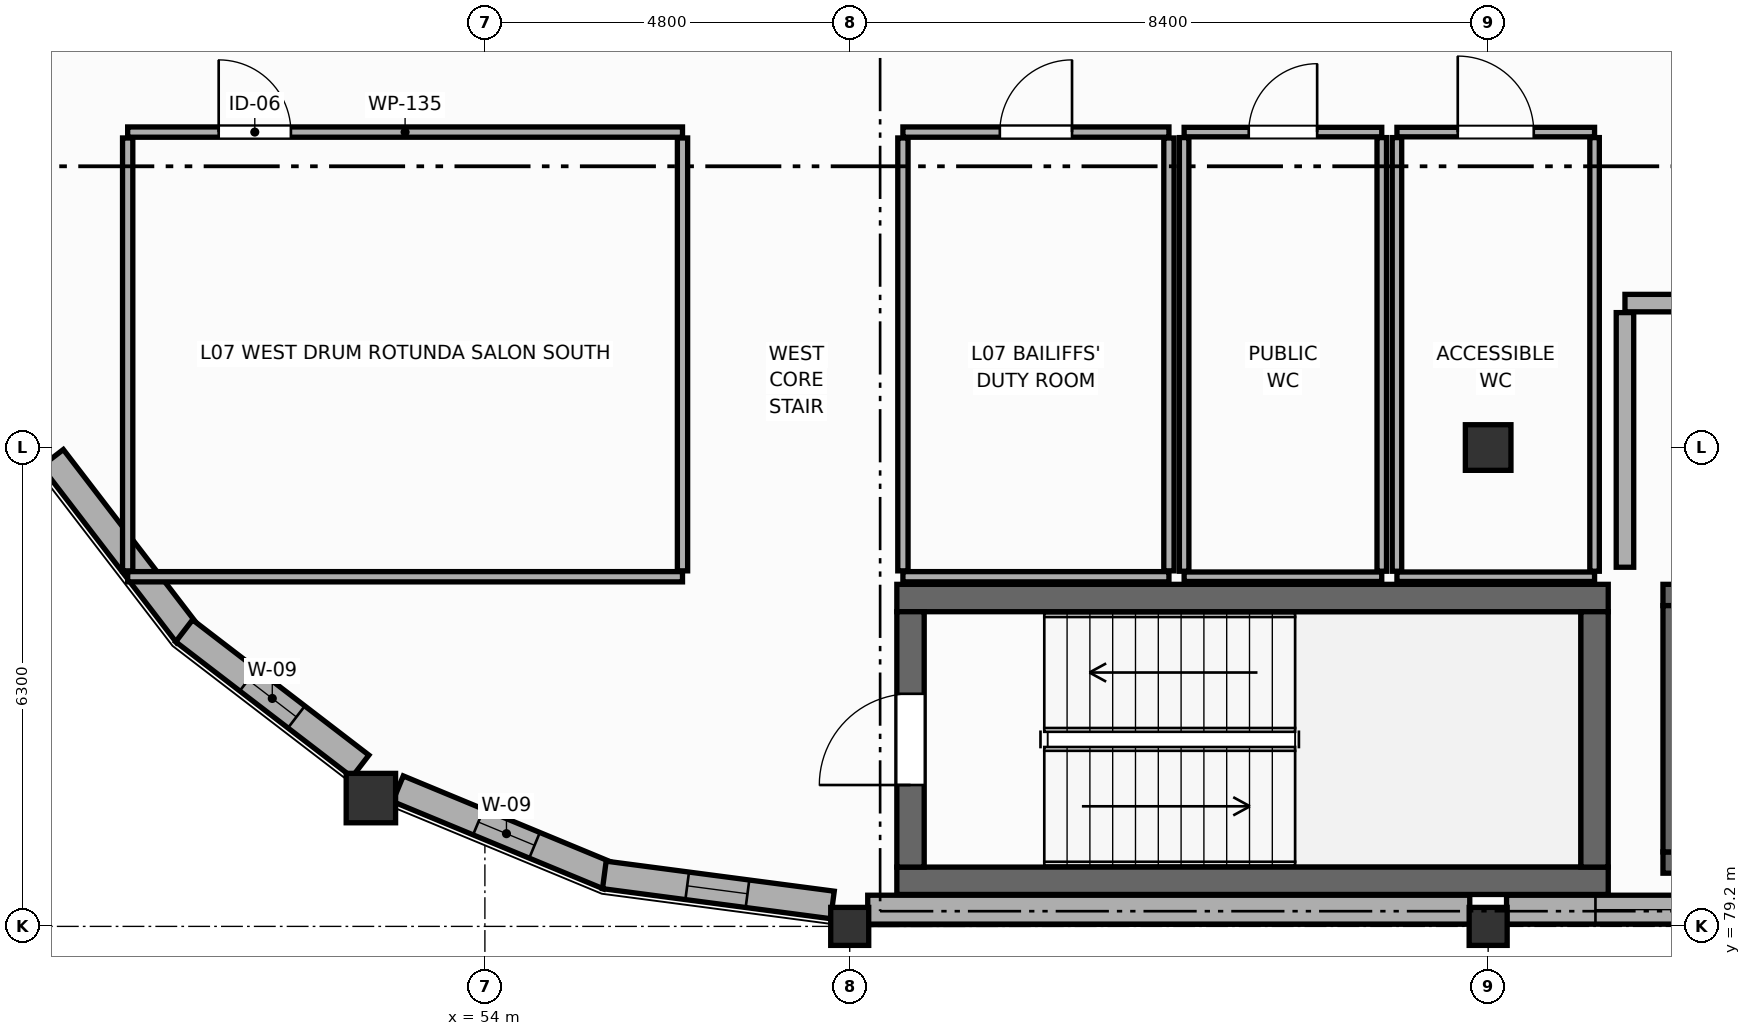
"""IFC4 building model, lengths in metres.
Left out: names, types, materials, properties, quantities, classifications, styles, units other than length and angle.
Written with IfcOpenShell. Run it as: python <this file> out.ifc"""

import sys

from ifc_helpers import new_model, si_unit, direction, frame, frame_2d, origin, origin_2d, place, context, subcontext, project, spatial, rectangle, circle, extrude, element, fill, save


model = new_model("IFC4")
c1 = context("Model", 3, precision=1e-05, world=origin(), true_north=direction((0.0, 1.0)))
c2 = subcontext(c1, "Body", "Model", "MODEL_VIEW")
j1 = project(units=[si_unit("LENGTHUNIT", "METRE"), si_unit("PLANEANGLEUNIT", "RADIAN")], contexts=[c1])
p1 = place(None, origin())
s1 = spatial("IfcSite", under=j1, at=p1, CompositionType="ELEMENT")
p2 = place(p1, origin())
s2 = spatial("IfcBuilding", under=s1, at=p2, CompositionType="ELEMENT")
p3 = place(p2, frame((0.0, 0.0, 27.0)))
s3 = spatial("IfcBuildingStorey", under=s2, at=p3, CompositionType="ELEMENT", Elevation=27.0)
for number, where, z_axis, x_axis in (
    (1, (58.8, 79.2, 0.0), (0.0, 0.0, 1.0), (1.0, 0.0, 0.0)),
    (2, (67.2, 79.2, 0.0), (0.0, 0.0, 1.0), (1.0, 0.0, 0.0)),
):
    element("IfcColumn", number, at=place(p3, frame(where, z_axis=z_axis, x_axis=x_axis)), inside=s3, PredefinedType="COLUMN", context=c2, shape_type="SweptSolid", body=[
        extrude(rectangle(XDim=0.5, YDim=0.5, at=origin_2d()), origin(), (0.0, 0.0, 1.0), 4.2),
    ])
p4 = place(p3, frame((67.2, 85.5, 0.0), z_axis=(0.0, 0.0, 1.0), x_axis=(1.0, 0.0, 0.0)))
e3 = element("IfcColumn", 3, at=p4, inside=s3, PredefinedType="COLUMN", context=c2, shape_type="SweptSolid", body=[
    extrude(rectangle(XDim=0.6, YDim=0.6, at=origin_2d()), origin(), (0.0, 0.0, 1.0), 4.2),
])
p5 = place(p3, frame((52.5, 80.888, 0.0), z_axis=(0.0, 0.0, 1.0), x_axis=(1.0, 0.0, 0.0)))
e4 = element("IfcColumn", 4, at=p5, inside=s3, PredefinedType="COLUMN", context=c2, shape_type="SweptSolid", body=[
    extrude(circle(Radius=0.325, at=origin_2d()), origin(), (0.0, 0.0, 1.0), 4.2),
])
p6 = place(p3, frame((66.958, 79.42, 0.0), z_axis=(0.0, 0.0, 1.0), x_axis=(-1.0, 0.0, 0.0)))
e5 = element("IfcWall", 5, at=p6, inside=s3, PredefinedType="STANDARD", context=c2, shape_type="SweptSolid", body=[
    extrude(rectangle(XDim=7.921, YDim=0.38, at=frame_2d((3.96, 0.0))), origin(), (0.0, 0.0, 1.0), 3.11),
])
p7 = place(p3, frame((75.358, 79.42, 0.0), z_axis=(0.0, 0.0, 1.0), x_axis=(-1.0, 0.0, 0.0)))
e6 = element("IfcWall", 6, at=p7, inside=s3, PredefinedType="STANDARD", context=c2, shape_type="SweptSolid", body=[
    extrude(rectangle(XDim=7.916, YDim=0.38, at=frame_2d((3.958, 0.0))), origin(), (0.0, 0.0, 1.0), 3.51),
])
p8 = place(p7, frame((1.17, 0.0, 0.85)))
e7 = element("IfcOpeningElement", 7, at=p8, cuts=e6, PredefinedType="OPENING", context=c2, shape_type="SweptSolid", body=[
    extrude(rectangle(XDim=1.35, YDim=1.95, at=frame_2d((0.675, 0.975))), frame((0.0, 0.2, 0.0), z_axis=(0.0, -1.0, 0.0), x_axis=(1.0, 0.0, 0.0)), (0.0, 0.0, 1.0), 0.4),
])
p9 = place(p7, frame((3.283, 0.0, 0.85)))
e8 = element("IfcOpeningElement", 8, at=p9, cuts=e6, PredefinedType="OPENING", context=c2, shape_type="SweptSolid", body=[
    extrude(rectangle(XDim=1.35, YDim=1.95, at=frame_2d((0.675, 0.975))), frame((0.0, 0.2, 0.0), z_axis=(0.0, -1.0, 0.0), x_axis=(1.0, 0.0, 0.0)), (0.0, 0.0, 1.0), 0.4),
])
p10 = place(p7, frame((5.396, 0.0, 0.85)))
e9 = element("IfcOpeningElement", 9, at=p10, cuts=e6, PredefinedType="OPENING", context=c2, shape_type="SweptSolid", body=[
    extrude(rectangle(XDim=1.35, YDim=1.95, at=frame_2d((0.675, 0.975))), frame((0.0, 0.2, 0.0), z_axis=(0.0, -1.0, 0.0), x_axis=(1.0, 0.0, 0.0)), (0.0, 0.0, 1.0), 0.4),
])
p11 = place(p3, frame((48.309, 85.363, 0.0), z_axis=(0.0, 0.0, 1.0), x_axis=(0.60876624393, -0.793349645649, 0.0)))
e10 = element("IfcWall", 10, at=p11, inside=s3, PredefinedType="ELEMENTEDWALL", context=c2, shape_type="SweptSolid", body=[
    extrude(rectangle(XDim=2.924, YDim=0.365, at=frame_2d((1.462, 0.0))), origin(), (0.0, 0.0, 1.0), 3.11),
])
p12 = place(p3, frame((50.043, 83.089, 0.0), z_axis=(0.0, 0.0, 1.0), x_axis=(0.793318703663, -0.608806565682, 0.0)))
e11 = element("IfcWall", 11, at=p12, inside=s3, PredefinedType="ELEMENTEDWALL", context=c2, shape_type="SweptSolid", body=[
    extrude(rectangle(XDim=2.924, YDim=0.365, at=frame_2d((1.462, 0.0))), origin(), (0.0, 0.0, 1.0), 3.01),
])
p13 = place(p12, frame((1.062, 0.0, 0.85)))
e12 = element("IfcOpeningElement", 12, at=p13, cuts=e11, PredefinedType="OPENING", context=c2, shape_type="SweptSolid", body=[
    extrude(rectangle(XDim=0.8, YDim=1.7, at=frame_2d((0.4, 0.85))), frame((0.0, 0.192, 0.0), z_axis=(0.0, -1.0, 0.0), x_axis=(1.0, 0.0, 0.0)), (0.0, 0.0, 1.0), 0.385),
])
p14 = place(p3, frame((52.856, 81.011, 0.0), z_axis=(0.0, 0.0, 1.0), x_axis=(0.923872366395, -0.382700732442, 0.0)))
e13 = element("IfcWall", 13, at=p14, inside=s3, PredefinedType="ELEMENTEDWALL", context=c2, shape_type="SweptSolid", body=[
    extrude(rectangle(XDim=3.007, YDim=0.365, at=frame_2d((1.504, 0.0))), origin(), (0.0, 0.0, 1.0), 3.01),
])
p15 = place(p14, frame((1.145, 0.0, 0.85)))
e14 = element("IfcOpeningElement", 14, at=p15, cuts=e13, PredefinedType="OPENING", context=c2, shape_type="SweptSolid", body=[
    extrude(rectangle(XDim=0.8, YDim=1.7, at=frame_2d((0.4, 0.85))), frame((0.0, 0.192, 0.0), z_axis=(0.0, -1.0, 0.0), x_axis=(1.0, 0.0, 0.0)), (0.0, 0.0, 1.0), 0.385),
])
p16 = place(p3, frame((55.572, 79.877, 0.0), z_axis=(0.0, 0.0, 1.0), x_axis=(0.991438641413, -0.130573428817, 0.0)))
e15 = element("IfcWall", 15, at=p16, inside=s3, PredefinedType="ELEMENTEDWALL", context=c2, shape_type="SweptSolid", body=[
    extrude(rectangle(XDim=3.027, YDim=0.365, at=frame_2d((1.514, 0.0))), origin(), (0.0, 0.0, 1.0), 3.11),
])
p17 = place(p16, frame((1.1, 0.0, 0.85)))
e16 = element("IfcOpeningElement", 16, at=p17, cuts=e15, PredefinedType="OPENING", context=c2, shape_type="SweptSolid", body=[
    extrude(rectangle(XDim=0.8, YDim=1.7, at=frame_2d((0.4, 0.85))), frame((0.0, 0.192, 0.0), z_axis=(0.0, -1.0, 0.0), x_axis=(1.0, 0.0, 0.0)), (0.0, 0.0, 1.0), 0.385),
])
for number, where, z_axis, x_axis in (
    (17, (59.42, 83.52, 0.0), (0.0, 0.0, 1.0), (1.0, 0.0, 0.0)),
    (18, (68.78, 79.8, 0.0), (0.0, 0.0, 1.0), (-1.0, 0.0, 0.0)),
):
    element("IfcWall", number, at=place(p3, frame(where, z_axis=z_axis, x_axis=x_axis)), inside=s3, PredefinedType="SHEAR", context=c2, shape_type="SweptSolid", body=[
        extrude(rectangle(XDim=9.36, YDim=0.36, at=frame_2d((4.68, 0.0))), origin(), (0.0, 0.0, 1.0), 3.98),
    ])
p18 = place(p3, frame((59.6, 79.98, 0.0), z_axis=(0.0, 0.0, 1.0), x_axis=(0.0, 1.0, 0.0)))
e19 = element("IfcWall", 19, at=p18, inside=s3, PredefinedType="SHEAR", context=c2, shape_type="SweptSolid", body=[
    extrude(rectangle(XDim=3.36, YDim=0.36, at=frame_2d((1.68, 0.0))), origin(), (0.0, 0.0, 1.0), 3.98),
])
p19 = place(p18, frame((1.08, 0.0, 0.0)))
e20 = element("IfcOpeningElement", 20, at=p19, cuts=e19, PredefinedType="OPENING", context=c2, shape_type="SweptSolid", body=[
    extrude(rectangle(XDim=1.2, YDim=2.2, at=frame_2d((0.6, 1.1))), frame((0.0, 0.19, 0.0), z_axis=(0.0, -1.0, 0.0), x_axis=(1.0, 0.0, 0.0)), (0.0, 0.0, 1.0), 0.38),
])
p20 = place(p3, frame((68.6, 83.34, 0.0), z_axis=(0.0, 0.0, 1.0), x_axis=(0.0, -1.0, 0.0)))
e21 = element("IfcWall", 21, at=p20, inside=s3, PredefinedType="SHEAR", context=c2, shape_type="SweptSolid", body=[
    extrude(rectangle(XDim=3.36, YDim=0.36, at=frame_2d((1.68, 0.0))), origin(), (0.0, 0.0, 1.0), 3.98),
])
p21 = place(p3, frame((69.5, 83.56, 0.0), z_axis=(0.0, 0.0, 1.0), x_axis=(1.0, 0.0, 0.0)))
e22 = element("IfcWall", 22, at=p21, inside=s3, PredefinedType="SHEAR", context=c2, shape_type="SweptSolid", body=[
    extrude(rectangle(XDim=3.0, YDim=0.28, at=frame_2d((1.5, 0.0))), origin(), (0.0, 0.0, 1.0), 3.98),
])
p22 = place(p21, frame((0.95, 0.0, 0.0)))
e23 = element("IfcOpeningElement", 23, at=p22, cuts=e22, PredefinedType="OPENING", context=c2, shape_type="SweptSolid", body=[
    extrude(rectangle(XDim=1.1, YDim=2.2, at=frame_2d((0.55, 1.1))), frame((0.0, 0.15, 0.0), z_axis=(0.0, -1.0, 0.0), x_axis=(1.0, 0.0, 0.0)), (0.0, 0.0, 1.0), 0.3),
])
p23 = place(p3, frame((72.5, 80.04, 0.0), z_axis=(0.0, 0.0, 1.0), x_axis=(-1.0, 0.0, 0.0)))
e24 = element("IfcWall", 24, at=p23, inside=s3, PredefinedType="SHEAR", context=c2, shape_type="SweptSolid", body=[
    extrude(rectangle(XDim=3.0, YDim=0.28, at=frame_2d((1.5, 0.0))), origin(), (0.0, 0.0, 1.0), 3.98),
])
p24 = place(p3, frame((69.64, 80.18, 0.0), z_axis=(0.0, 0.0, 1.0), x_axis=(0.0, 1.0, 0.0)))
e25 = element("IfcWall", 25, at=p24, inside=s3, PredefinedType="SHEAR", context=c2, shape_type="SweptSolid", body=[
    extrude(rectangle(XDim=3.24, YDim=0.28, at=frame_2d((1.62, 0.0))), origin(), (0.0, 0.0, 1.0), 3.98),
])
p25 = place(p3, frame((69.0, 87.4, 0.0), z_axis=(0.0, 0.0, 1.0), x_axis=(1.0, 0.0, 0.0)))
e26 = element("IfcWall", 26, at=p25, inside=s3, PredefinedType="STANDARD", context=c2, shape_type="SweptSolid", body=[
    extrude(rectangle(XDim=5.4, YDim=0.23, at=frame_2d((2.7, 0.0))), origin(), (0.0, 0.0, 1.0), 3.965),
])
p26 = place(p25, frame((2.05, 0.0, 0.0)))
e27 = element("IfcOpeningElement", 27, at=p26, cuts=e26, PredefinedType="OPENING", context=c2, shape_type="SweptSolid", body=[
    extrude(rectangle(XDim=1.3, YDim=2.2, at=frame_2d((0.65, 1.1))), frame((0.0, 0.125, 0.0), z_axis=(0.0, -1.0, 0.0), x_axis=(1.0, 0.0, 0.0)), (0.0, 0.0, 1.0), 0.25),
])
p27 = place(p3, frame((69.0, 83.925, 0.0), z_axis=(0.0, 0.0, 1.0), x_axis=(0.0, 1.0, 0.0)))
e28 = element("IfcWall", 28, at=p27, inside=s3, PredefinedType="STANDARD", context=c2, shape_type="SweptSolid", body=[
    extrude(rectangle(XDim=3.35, YDim=0.23, at=frame_2d((1.675, 0.0))), origin(), (0.0, 0.0, 1.0), 3.41),
])
p28 = place(p3, frame((63.2, 89.65, 0.0), z_axis=(0.0, 0.0, 1.0), x_axis=(1.0, 0.0, 0.0)))
e29 = element("IfcWall", 29, at=p28, inside=s3, PredefinedType="PARTITIONING", context=c2, shape_type="SweptSolid", body=[
    extrude(rectangle(XDim=2.6, YDim=0.125, at=frame_2d((1.3, 0.0))), origin(), (0.0, 0.0, 1.0), 3.965),
])
p29 = place(p28, frame((0.85, 0.0, 0.0)))
e30 = element("IfcOpeningElement", 30, at=p29, cuts=e29, PredefinedType="OPENING", context=c2, shape_type="SweptSolid", body=[
    extrude(rectangle(XDim=0.9, YDim=2.1, at=frame_2d((0.45, 1.05))), frame((0.0, 0.073, 0.0), z_axis=(0.0, -1.0, 0.0), x_axis=(1.0, 0.0, 0.0)), (0.0, 0.0, 1.0), 0.145),
])
p30 = place(p3, frame((65.8, 83.8, 0.0), z_axis=(0.0, 0.0, 1.0), x_axis=(-1.0, 0.0, 0.0)))
e31 = element("IfcWall", 31, at=p30, inside=s3, PredefinedType="PARTITIONING", context=c2, shape_type="SweptSolid", body=[
    extrude(rectangle(XDim=2.6, YDim=0.125, at=frame_2d((1.3, 0.0))), origin(), (0.0, 0.0, 1.0), 3.965),
])
for number, where, z_axis, x_axis in (
    (32, (63.2, 83.873, 0.0), (0.0, 0.0, 1.0), (0.0, 1.0, 0.0)),
    (33, (65.8, 89.577, 0.0), (0.0, 0.0, 1.0), (0.0, -1.0, 0.0)),
):
    element("IfcWall", number, at=place(p3, frame(where, z_axis=z_axis, x_axis=x_axis)), inside=s3, PredefinedType="PARTITIONING", context=c2, shape_type="SweptSolid", body=[
        extrude(rectangle(XDim=5.705, YDim=0.125, at=frame_2d((2.853, 0.0))), origin(), (0.0, 0.0, 1.0), 3.965),
    ])
p31 = place(p3, frame((66.0, 89.65, 0.0), z_axis=(0.0, 0.0, 1.0), x_axis=(1.0, 0.0, 0.0)))
e34 = element("IfcWall", 34, at=p31, inside=s3, PredefinedType="PARTITIONING", context=c2, shape_type="SweptSolid", body=[
    extrude(rectangle(XDim=2.6, YDim=0.125, at=frame_2d((1.3, 0.0))), origin(), (0.0, 0.0, 1.0), 3.51),
])
p32 = place(p31, frame((0.8, 0.0, 0.0)))
e35 = element("IfcOpeningElement", 35, at=p32, cuts=e34, PredefinedType="OPENING", context=c2, shape_type="SweptSolid", body=[
    extrude(rectangle(XDim=1.0, YDim=2.1, at=frame_2d((0.5, 1.05))), frame((0.0, 0.073, 0.0), z_axis=(0.0, -1.0, 0.0), x_axis=(1.0, 0.0, 0.0)), (0.0, 0.0, 1.0), 0.145),
])
p33 = place(p3, frame((68.6, 83.8, 0.0), z_axis=(0.0, 0.0, 1.0), x_axis=(-1.0, 0.0, 0.0)))
e36 = element("IfcWall", 36, at=p33, inside=s3, PredefinedType="PARTITIONING", context=c2, shape_type="SweptSolid", body=[
    extrude(rectangle(XDim=2.6, YDim=0.125, at=frame_2d((1.3, 0.0))), origin(), (0.0, 0.0, 1.0), 3.51),
])
p34 = place(p3, frame((66.0, 83.873, 0.0), z_axis=(0.0, 0.0, 1.0), x_axis=(0.0, 1.0, 0.0)))
e37 = element("IfcWall", 37, at=p34, inside=s3, PredefinedType="PARTITIONING", context=c2, shape_type="SweptSolid", body=[
    extrude(rectangle(XDim=5.705, YDim=0.125, at=frame_2d((2.853, 0.0))), origin(), (0.0, 0.0, 1.0), 3.965),
])
p35 = place(p3, frame((68.6, 89.577, 0.0), z_axis=(0.0, 0.0, 1.0), x_axis=(0.0, -1.0, 0.0)))
e38 = element("IfcWall", 38, at=p35, inside=s3, PredefinedType="PARTITIONING", context=c2, shape_type="SweptSolid", body=[
    extrude(rectangle(XDim=5.705, YDim=0.125, at=frame_2d((2.853, 0.0))), origin(), (0.0, 0.0, 1.0), 3.41),
])
p36 = place(p3, frame((59.5, 89.65, 0.0), z_axis=(0.0, 0.0, 1.0), x_axis=(1.0, 0.0, 0.0)))
e39 = element("IfcWall", 39, at=p36, inside=s3, PredefinedType="PARTITIONING", context=c2, shape_type="SweptSolid", body=[
    extrude(rectangle(XDim=3.5, YDim=0.135, at=frame_2d((1.75, 0.0))), origin(), (0.0, 0.0, 1.0), 3.965),
])
p37 = place(p36, frame((1.275, 0.0, 0.0)))
e40 = element("IfcOpeningElement", 40, at=p37, cuts=e39, PredefinedType="OPENING", context=c2, shape_type="SweptSolid", body=[
    extrude(rectangle(XDim=0.95, YDim=2.15, at=frame_2d((0.475, 1.075))), frame((0.0, 0.077, 0.0), z_axis=(0.0, -1.0, 0.0), x_axis=(1.0, 0.0, 0.0)), (0.0, 0.0, 1.0), 0.155),
])
p38 = place(p3, frame((63.0, 83.8, 0.0), z_axis=(0.0, 0.0, 1.0), x_axis=(-1.0, 0.0, 0.0)))
e41 = element("IfcWall", 41, at=p38, inside=s3, PredefinedType="PARTITIONING", context=c2, shape_type="SweptSolid", body=[
    extrude(rectangle(XDim=3.5, YDim=0.135, at=frame_2d((1.75, 0.0))), origin(), (0.0, 0.0, 1.0), 3.965),
])
for number, where, z_axis, x_axis in (
    (42, (59.5, 83.877, 0.0), (0.0, 0.0, 1.0), (0.0, 1.0, 0.0)),
    (43, (63.0, 89.573, 0.0), (0.0, 0.0, 1.0), (0.0, -1.0, 0.0)),
):
    element("IfcWall", number, at=place(p3, frame(where, z_axis=z_axis, x_axis=x_axis)), inside=s3, PredefinedType="PARTITIONING", context=c2, shape_type="SweptSolid", body=[
        extrude(rectangle(XDim=5.695, YDim=0.135, at=frame_2d((2.848, 0.0))), origin(), (0.0, 0.0, 1.0), 3.965),
    ])
p39 = place(p3, frame((49.3, 89.65, 0.0), z_axis=(0.0, 0.0, 1.0), x_axis=(1.0, 0.0, 0.0)))
e44 = element("IfcWall", 44, at=p39, inside=s3, PredefinedType="PARTITIONING", context=c2, shape_type="SweptSolid", body=[
    extrude(rectangle(XDim=7.3, YDim=0.135, at=frame_2d((3.65, 0.0))), origin(), (0.0, 0.0, 1.0), 3.01),
])
p40 = place(p39, frame((1.198, 0.0, 0.0)))
e45 = element("IfcOpeningElement", 45, at=p40, cuts=e44, PredefinedType="OPENING", context=c2, shape_type="SweptSolid", body=[
    extrude(rectangle(XDim=0.95, YDim=2.15, at=frame_2d((0.475, 1.075))), frame((0.0, 0.077, 0.0), z_axis=(0.0, -1.0, 0.0), x_axis=(1.0, 0.0, 0.0)), (0.0, 0.0, 1.0), 0.155),
])
p41 = place(p3, frame((56.6, 83.8, 0.0), z_axis=(0.0, 0.0, 1.0), x_axis=(-1.0, 0.0, 0.0)))
e46 = element("IfcWall", 46, at=p41, inside=s3, PredefinedType="PARTITIONING", context=c2, shape_type="SweptSolid", body=[
    extrude(rectangle(XDim=7.3, YDim=0.135, at=frame_2d((3.65, 0.0))), origin(), (0.0, 0.0, 1.0), 3.01),
])
p42 = place(p3, frame((49.3, 83.877, 0.0), z_axis=(0.0, 0.0, 1.0), x_axis=(0.0, 1.0, 0.0)))
e47 = element("IfcWall", 47, at=p42, inside=s3, PredefinedType="PARTITIONING", context=c2, shape_type="SweptSolid", body=[
    extrude(rectangle(XDim=5.695, YDim=0.135, at=frame_2d((2.848, 0.0))), origin(), (0.0, 0.0, 1.0), 3.61),
])
p43 = place(p3, frame((56.6, 89.573, 0.0), z_axis=(0.0, 0.0, 1.0), x_axis=(0.0, -1.0, 0.0)))
e48 = element("IfcWall", 48, at=p43, inside=s3, PredefinedType="PARTITIONING", context=c2, shape_type="SweptSolid", body=[
    extrude(rectangle(XDim=5.695, YDim=0.135, at=frame_2d((2.848, 0.0))), origin(), (0.0, 0.0, 1.0), 3.965),
])
p44 = place(p10, origin())
e49 = element("IfcWindow", 49, at=p44, inside=s3, PartitioningType="SINGLE_PANEL", PredefinedType="WINDOW", context=c2, shape_type="SweptSolid", body=[
    extrude(rectangle(XDim=1.35, YDim=1.95, at=frame_2d((0.675, 0.975))), frame((0.0, 0.03, 0.0), z_axis=(0.0, -1.0, 0.0), x_axis=(1.0, 0.0, 0.0)), (0.0, 0.0, 1.0), 0.06),
])
fill(e9, e49)
p45 = place(p13, origin())
e50 = element("IfcWindow", 50, at=p45, inside=s3, PartitioningType="SINGLE_PANEL", PredefinedType="WINDOW", context=c2, shape_type="SweptSolid", body=[
    extrude(rectangle(XDim=0.8, YDim=1.7, at=frame_2d((0.4, 0.85))), frame((0.0, 0.03, 0.0), z_axis=(0.0, -1.0, 0.0), x_axis=(1.0, 0.0, 0.0)), (0.0, 0.0, 1.0), 0.06),
])
fill(e12, e50)
p46 = place(p15, origin())
e51 = element("IfcWindow", 51, at=p46, inside=s3, PartitioningType="SINGLE_PANEL", PredefinedType="WINDOW", context=c2, shape_type="SweptSolid", body=[
    extrude(rectangle(XDim=0.8, YDim=1.7, at=frame_2d((0.4, 0.85))), frame((0.0, 0.03, 0.0), z_axis=(0.0, -1.0, 0.0), x_axis=(1.0, 0.0, 0.0)), (0.0, 0.0, 1.0), 0.06),
])
fill(e14, e51)
p47 = place(p17, origin())
e52 = element("IfcWindow", 52, at=p47, inside=s3, PartitioningType="SINGLE_PANEL", PredefinedType="WINDOW", context=c2, shape_type="SweptSolid", body=[
    extrude(rectangle(XDim=0.8, YDim=1.7, at=frame_2d((0.4, 0.85))), frame((0.0, 0.03, 0.0), z_axis=(0.0, -1.0, 0.0), x_axis=(1.0, 0.0, 0.0)), (0.0, 0.0, 1.0), 0.06),
])
fill(e16, e52)
p48 = place(p19, origin())
e53 = element("IfcDoor", 53, at=p48, inside=s3, OperationType="SINGLE_SWING_LEFT", PredefinedType="DOOR", context=c2, shape_type="SweptSolid", body=[
    extrude(rectangle(XDim=1.2, YDim=2.2, at=frame_2d((0.6, 1.1))), frame((0.0, 0.025, 0.0), z_axis=(0.0, -1.0, 0.0), x_axis=(1.0, 0.0, 0.0)), (0.0, 0.0, 1.0), 0.05),
])
fill(e20, e53)
p49 = place(p29, origin())
e54 = element("IfcDoor", 54, at=p49, inside=s3, OperationType="SINGLE_SWING_RIGHT", PredefinedType="DOOR", context=c2, shape_type="SweptSolid", body=[
    extrude(rectangle(XDim=0.9, YDim=2.1, at=frame_2d((0.45, 1.05))), frame((0.0, 0.025, 0.0), z_axis=(0.0, -1.0, 0.0), x_axis=(1.0, 0.0, 0.0)), (0.0, 0.0, 1.0), 0.05),
])
fill(e30, e54)
p50 = place(p32, origin())
e55 = element("IfcDoor", 55, at=p50, inside=s3, OperationType="SINGLE_SWING_LEFT", PredefinedType="DOOR", context=c2, shape_type="SweptSolid", body=[
    extrude(rectangle(XDim=1.0, YDim=2.1, at=frame_2d((0.5, 1.05))), frame((0.0, 0.025, 0.0), z_axis=(0.0, -1.0, 0.0), x_axis=(1.0, 0.0, 0.0)), (0.0, 0.0, 1.0), 0.05),
])
fill(e35, e55)
p51 = place(p37, origin())
e56 = element("IfcDoor", 56, at=p51, inside=s3, OperationType="SINGLE_SWING_RIGHT", PredefinedType="DOOR", context=c2, shape_type="SweptSolid", body=[
    extrude(rectangle(XDim=0.95, YDim=2.15, at=frame_2d((0.475, 1.075))), frame((0.0, 0.025, 0.0), z_axis=(0.0, -1.0, 0.0), x_axis=(1.0, 0.0, 0.0)), (0.0, 0.0, 1.0), 0.05),
])
fill(e40, e56)
p52 = place(p40, origin())
e57 = element("IfcDoor", 57, at=p52, inside=s3, OperationType="SINGLE_SWING_LEFT", PredefinedType="DOOR", context=c2, shape_type="SweptSolid", body=[
    extrude(rectangle(XDim=0.95, YDim=2.15, at=frame_2d((0.475, 1.075))), frame((0.0, 0.025, 0.0), z_axis=(0.0, -1.0, 0.0), x_axis=(1.0, 0.0, 0.0)), (0.0, 0.0, 1.0), 0.05),
])
fill(e45, e57)
save(model, sys.argv[1])
